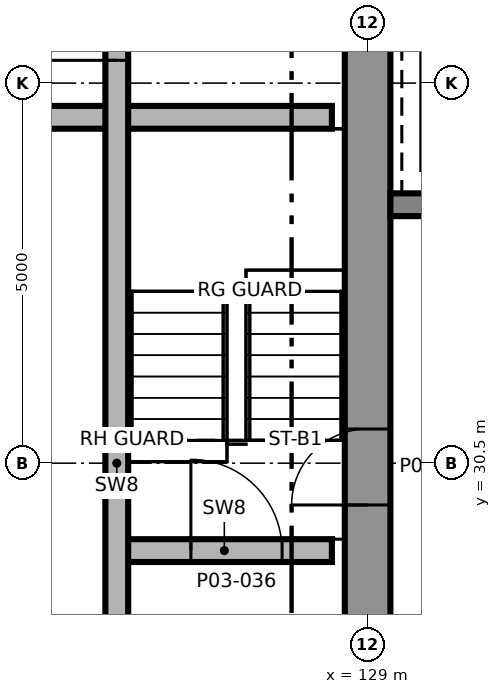
"""IFC4 building model, lengths in metres.
Left out: names, types, materials, properties, quantities, classifications, styles, units other than length and angle.
Written with IfcOpenShell. Run it as: python <this file> out.ifc"""

import sys

from ifc_helpers import new_model, si_unit, direction, frame, frame_2d, origin, place, context, subcontext, project, spatial, rectangle, extrude, element, fill, save


model = new_model("IFC4")
c1 = context("Model", 3, precision=1e-05, world=origin(), true_north=direction((0.0, 1.0)))
c2 = subcontext(c1, "Body", "Model", "MODEL_VIEW")
j1 = project(units=[si_unit("LENGTHUNIT", "METRE"), si_unit("PLANEANGLEUNIT", "RADIAN")], contexts=[c1])
p1 = place(None, origin())
s1 = spatial("IfcSite", under=j1, at=p1, CompositionType="ELEMENT")
p2 = place(p1, origin())
s2 = spatial("IfcBuilding", under=s1, at=p2, CompositionType="ELEMENT")
p3 = place(p2, frame((0.0, 0.0, 18.5)))
s3 = spatial("IfcBuildingStorey", under=s2, at=p3, CompositionType="ELEMENT", Elevation=18.5)
p4 = place(p3, frame((129.0, 24.8, 0.0), z_axis=(0.0, 0.0, 1.0), x_axis=(0.0, 1.0, 0.0)))
e1 = element("IfcWall", 1, at=p4, inside=s3, PredefinedType="SHEAR", context=c2, shape_type="SweptSolid", body=[
    extrude(rectangle(XDim=12.4, YDim=0.6, at=frame_2d((6.2, 0.0))), origin(), (0.0, 0.0, 1.0), 5.0),
])
p5 = place(p4, frame((5.15, 0.0, 0.0)))
e2 = element("IfcOpeningElement", 2, at=p5, cuts=e1, PredefinedType="OPENING", context=c2, shape_type="SweptSolid", body=[
    extrude(rectangle(XDim=1.0, YDim=2.1, at=frame_2d((0.5, 1.05))), frame((0.0, 0.31, 0.0), z_axis=(0.0, -1.0, 0.0), x_axis=(1.0, 0.0, 0.0)), (0.0, 0.0, 1.0), 0.62),
])
p6 = place(p3, frame((129.3, 33.9, 0.0), z_axis=(0.0, 0.0, 1.0), x_axis=(1.0, 0.0, 0.0)))
e3 = element("IfcWall", 3, at=p6, inside=s3, PredefinedType="SHEAR", context=c2, shape_type="SweptSolid", body=[
    extrude(rectangle(XDim=2.65, YDim=0.3, at=frame_2d((1.325, 0.0))), origin(), (0.0, 0.0, 1.0), 5.0),
])
p7 = place(p6, frame((1.05, 0.0, 0.0)))
e4 = element("IfcOpeningElement", 4, at=p7, cuts=e3, PredefinedType="OPENING", context=c2, shape_type="SweptSolid", body=[
    extrude(rectangle(XDim=1.3, YDim=2.4, at=frame_2d((0.65, 1.2))), frame((0.0, 0.16, 0.0), z_axis=(0.0, -1.0, 0.0), x_axis=(1.0, 0.0, 0.0)), (0.0, 0.0, 1.0), 0.32),
])
p8 = place(p3, frame((125.7, 29.35, 0.0), z_axis=(0.0, 0.0, 1.0), x_axis=(1.0, 0.0, 0.0)))
e5 = element("IfcWall", 5, at=p8, inside=s3, PredefinedType="SHEAR", context=c2, shape_type="SweptSolid", body=[
    extrude(rectangle(XDim=2.83, YDim=0.3, at=frame_2d((1.415, 0.0))), origin(), (0.0, 0.0, 1.0), 4.7),
])
p9 = place(p8, frame((0.975, 0.0, 0.0)))
e6 = element("IfcOpeningElement", 6, at=p9, cuts=e5, PredefinedType="OPENING", context=c2, shape_type="SweptSolid", body=[
    extrude(rectangle(XDim=1.2, YDim=2.1, at=frame_2d((0.6, 1.05))), frame((0.0, 0.16, 0.0), z_axis=(0.0, -1.0, 0.0), x_axis=(1.0, 0.0, 0.0)), (0.0, 0.0, 1.0), 0.32),
])
p10 = place(p3, frame((114.6, 35.05, 0.0), z_axis=(0.0, 0.0, 1.0), x_axis=(1.0, 0.0, 0.0)))
e7 = element("IfcWall", 7, at=p10, inside=s3, PredefinedType="SHEAR", context=c2, shape_type="SweptSolid", body=[
    extrude(rectangle(XDim=13.93, YDim=0.3, at=frame_2d((6.965, 0.0))), origin(), (0.0, 0.0, 1.0), 4.7),
])
p11 = place(p10, frame((5.13, 0.0, 0.0)))
e8 = element("IfcOpeningElement", 8, at=p11, cuts=e7, PredefinedType="OPENING", context=c2, shape_type="SweptSolid", body=[
    extrude(rectangle(XDim=1.0, YDim=2.1, at=frame_2d((0.5, 1.05))), frame((0.0, 0.16, 0.0), z_axis=(0.0, -1.0, 0.0), x_axis=(1.0, 0.0, 0.0)), (0.0, 0.0, 1.0), 0.32),
])
p12 = place(p3, frame((125.7, 11.07, 0.0), z_axis=(0.0, 0.0, 1.0), x_axis=(0.0, 1.0, 0.0)))
e9 = element("IfcWall", 9, at=p12, inside=s3, PredefinedType="SHEAR", context=c2, shape_type="SweptSolid", body=[
    extrude(rectangle(XDim=38.86, YDim=0.3, at=frame_2d((19.43, 0.0))), origin(), (0.0, 0.0, 1.0), 4.7),
])
p13 = place(p12, frame((24.73, 0.0, 0.0)))
e10 = element("IfcOpeningElement", 10, at=p13, cuts=e9, PredefinedType="OPENING", context=c2, shape_type="SweptSolid", body=[
    extrude(rectangle(XDim=1.2, YDim=2.1, at=frame_2d((0.6, 1.05))), frame((0.0, 0.16, 0.0), z_axis=(0.0, -1.0, 0.0), x_axis=(1.0, 0.0, 0.0)), (0.0, 0.0, 1.0), 0.32),
])
p14 = place(p9, origin())
e11 = element("IfcDoor", 11, at=p14, inside=s3, OperationType="SINGLE_SWING_RIGHT", PredefinedType="DOOR", context=c2, shape_type="SweptSolid", body=[
    extrude(rectangle(XDim=1.2, YDim=2.1, at=frame_2d((0.6, 1.05))), frame((0.0, 0.025, 0.0), z_axis=(0.0, -1.0, 0.0), x_axis=(1.0, 0.0, 0.0)), (0.0, 0.0, 1.0), 0.05),
])
fill(e6, e11)
p15 = place(p13, origin())
e12 = element("IfcDoor", 12, at=p15, inside=s3, OperationType="SINGLE_SWING_LEFT", PredefinedType="DOOR", context=c2, shape_type="SweptSolid", body=[
    extrude(rectangle(XDim=1.2, YDim=2.1, at=frame_2d((0.6, 1.05))), frame((0.0, 0.025, 0.0), z_axis=(0.0, -1.0, 0.0), x_axis=(1.0, 0.0, 0.0)), (0.0, 0.0, 1.0), 0.05),
])
fill(e10, e12)
p16 = place(p5, origin())
e13 = element("IfcDoor", 13, at=p16, inside=s3, OperationType="SINGLE_SWING_RIGHT", PredefinedType="DOOR", context=c2, shape_type="SweptSolid", body=[
    extrude(rectangle(XDim=1.0, YDim=2.1, at=frame_2d((0.5, 1.05))), frame((0.0, 0.025, 0.0), z_axis=(0.0, -1.0, 0.0), x_axis=(1.0, 0.0, 0.0)), (0.0, 0.0, 1.0), 0.05),
])
fill(e2, e13)
save(model, sys.argv[1])
